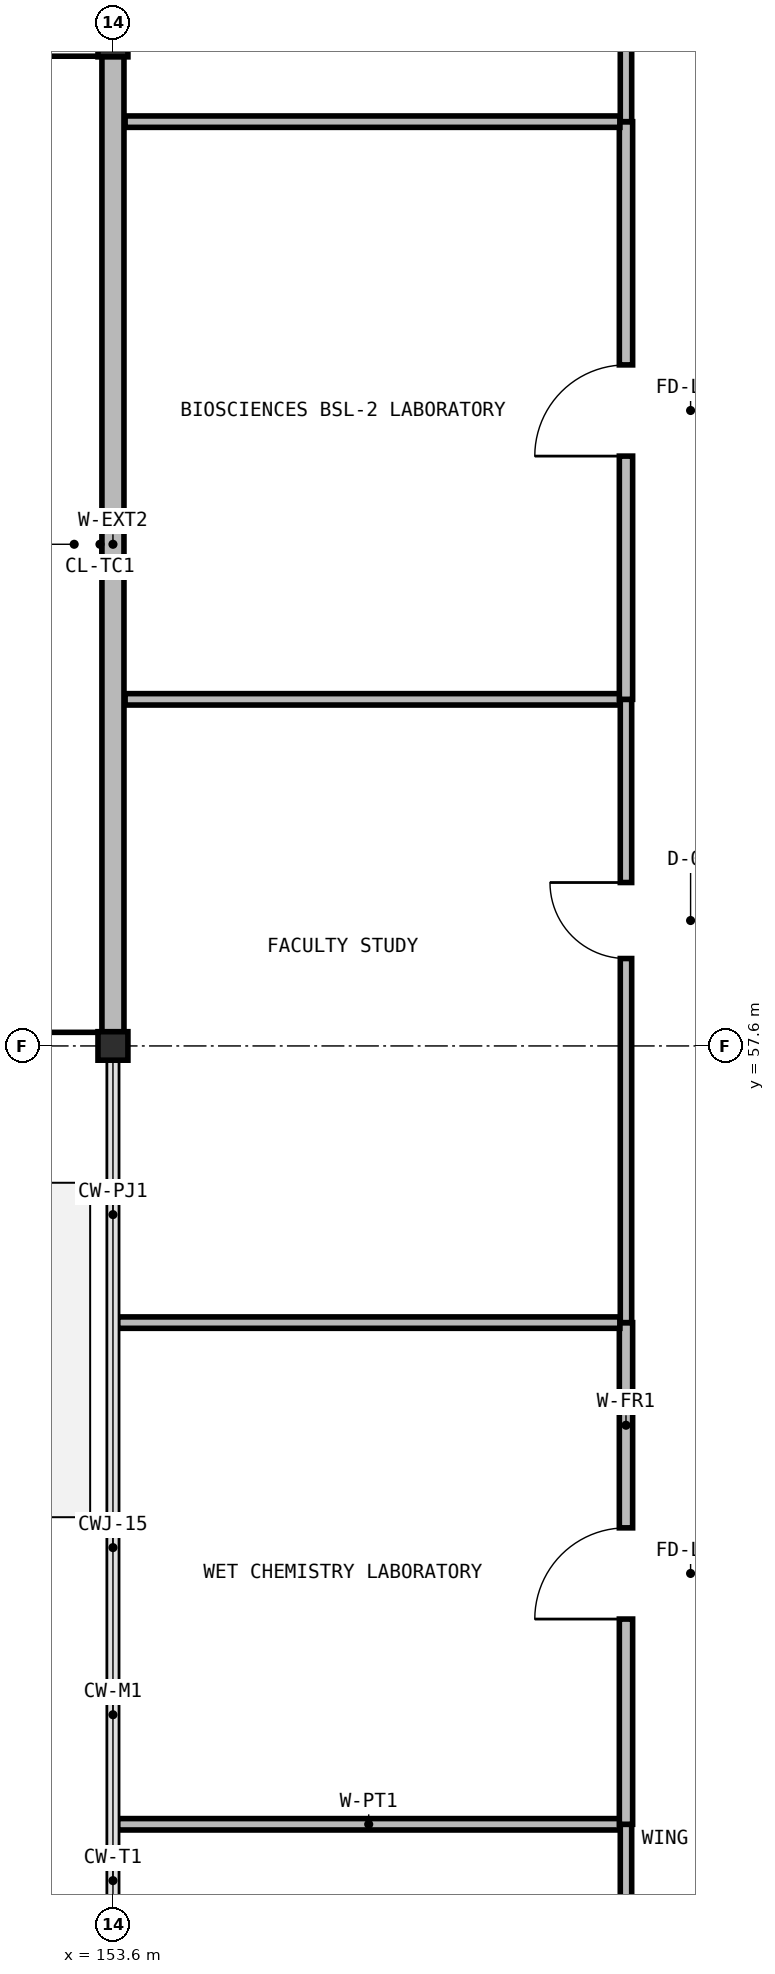
"""IFC4 building model, lengths in metres.
Left out: names, types, materials, properties, quantities, classifications, styles, units other than length and angle.
Written with IfcOpenShell. Run it as: python <this file> out.ifc"""

import sys

from ifc_helpers import new_model, si_unit, direction, frame, frame_2d, origin, origin_2d, place, context, subcontext, project, spatial, rectangle, i_section, extrude, element, fill, save


model = new_model("IFC4")
c1 = context("Model", 3, precision=1e-05, world=origin(), true_north=direction((0.0, 1.0)))
c2 = subcontext(c1, "Body", "Model", "MODEL_VIEW")
j1 = project(units=[si_unit("LENGTHUNIT", "METRE"), si_unit("PLANEANGLEUNIT", "RADIAN")], contexts=[c1])
p1 = place(None, origin())
s1 = spatial("IfcSite", under=j1, at=p1, CompositionType="ELEMENT")
p2 = place(p1, origin())
s2 = spatial("IfcBuilding", under=s1, at=p2, CompositionType="ELEMENT")
p3 = place(p2, frame((0.0, 0.0, 9.8)))
s3 = spatial("IfcBuildingStorey", under=s2, at=p3, CompositionType="ELEMENT", Elevation=9.8)
for number, where, z_axis, x_axis in (
    (1, (153.6, 57.6, 0.0), (0.0, 0.0, 1.0), (1.0, 0.0, 0.0)),
    (2, (153.6, 70.8, 0.0), (0.0, 0.0, 1.0), (1.0, 0.0, 0.0)),
):
    element("IfcColumn", number, at=place(p3, frame(where, z_axis=z_axis, x_axis=x_axis)), inside=s3, PredefinedType="COLUMN", context=c2, shape_type="SweptSolid", body=[
        extrude(i_section(OverallWidth=0.394, OverallDepth=0.375, WebThickness=0.02, FlangeThickness=0.032, at=origin_2d()), origin(), (0.0, 0.0, 1.0), 4.55),
    ])
p4 = place(p3, frame((153.6, 57.604, 0.0), z_axis=(0.0, 0.0, 1.0), x_axis=(0.0, 1.0, 0.0)))
e3 = element("IfcWall", 3, at=p4, inside=s3, PredefinedType="SOLIDWALL", context=c2, shape_type="SweptSolid", body=[
    extrude(rectangle(XDim=13.192, YDim=0.29, at=frame_2d((6.596, 0.0))), origin(), (0.0, 0.0, 1.0), 3.742),
])
p5 = place(p3, frame((160.35, 37.96, 0.0), z_axis=(0.0, 0.0, 1.0), x_axis=(0.0, 1.0, 0.0)))
e4 = element("IfcWall", 4, at=p5, inside=s3, PredefinedType="PARTITIONING", context=c2, shape_type="SweptSolid", body=[
    extrude(rectangle(XDim=9.4, YDim=0.15, at=frame_2d((4.7, 0.0))), origin(), (0.0, 0.0, 1.0), 4.3),
])
p6 = place(p5, frame((4.2, 0.0, 0.0)))
e5 = element("IfcOpeningElement", 5, at=p6, cuts=e4, PredefinedType="OPENING", context=c2, shape_type="SweptSolid", body=[
    extrude(rectangle(XDim=1.0, YDim=2.2, at=frame_2d((0.5, 1.1))), frame((0.0, 0.085, 0.0), z_axis=(0.0, -1.0, 0.0), x_axis=(1.0, 0.0, 0.0)), (0.0, 0.0, 1.0), 0.17),
])
p7 = place(p3, frame((153.66, 47.36, 0.0), z_axis=(0.0, 0.0, 1.0), x_axis=(1.0, 0.0, 0.0)))
e6 = element("IfcWall", 6, at=p7, inside=s3, PredefinedType="PARTITIONING", context=c2, shape_type="SweptSolid", body=[
    extrude(rectangle(XDim=6.61, YDim=0.15, at=frame_2d((3.305, 0.0))), origin(), (0.0, 0.0, 1.0), 4.3),
])
p8 = place(p3, frame((160.35, 47.36, 0.0), z_axis=(0.0, 0.0, 1.0), x_axis=(0.0, 1.0, 0.0)))
e7 = element("IfcWall", 7, at=p8, inside=s3, PredefinedType="PARTITIONING", context=c2, shape_type="SweptSolid", body=[
    extrude(rectangle(XDim=6.6, YDim=0.175, at=frame_2d((3.3, 0.0))), origin(), (0.0, 0.0, 1.0), 4.3),
])
p9 = place(p8, frame((2.7, 0.0, 0.0)))
e8 = element("IfcOpeningElement", 8, at=p9, cuts=e7, PredefinedType="OPENING", context=c2, shape_type="SweptSolid", body=[
    extrude(rectangle(XDim=1.2, YDim=2.2, at=frame_2d((0.6, 1.1))), frame((0.0, 0.097, 0.0), z_axis=(0.0, -1.0, 0.0), x_axis=(1.0, 0.0, 0.0)), (0.0, 0.0, 1.0), 0.195),
])
p10 = place(p3, frame((153.66, 53.96, 0.0), z_axis=(0.0, 0.0, 1.0), x_axis=(1.0, 0.0, 0.0)))
e9 = element("IfcWall", 9, at=p10, inside=s3, PredefinedType="PARTITIONING", context=c2, shape_type="SweptSolid", body=[
    extrude(rectangle(XDim=6.61, YDim=0.15, at=frame_2d((3.305, 0.0))), origin(), (0.0, 0.0, 1.0), 4.3),
])
p11 = place(p3, frame((160.35, 53.96, 0.0), z_axis=(0.0, 0.0, 1.0), x_axis=(0.0, 1.0, 0.0)))
e10 = element("IfcWall", 10, at=p11, inside=s3, PredefinedType="PARTITIONING", context=c2, shape_type="SweptSolid", body=[
    extrude(rectangle(XDim=8.2, YDim=0.15, at=frame_2d((4.1, 0.0))), origin(), (0.0, 0.0, 1.0), 4.3),
])
p12 = place(p11, frame((4.79, 0.0, 0.0)))
e11 = element("IfcOpeningElement", 11, at=p12, cuts=e10, PredefinedType="OPENING", context=c2, shape_type="SweptSolid", body=[
    extrude(rectangle(XDim=1.0, YDim=2.2, at=frame_2d((0.5, 1.1))), frame((0.0, 0.085, 0.0), z_axis=(0.0, -1.0, 0.0), x_axis=(1.0, 0.0, 0.0)), (0.0, 0.0, 1.0), 0.17),
])
p13 = place(p3, frame((153.76, 62.16, 0.0), z_axis=(0.0, 0.0, 1.0), x_axis=(1.0, 0.0, 0.0)))
e12 = element("IfcWall", 12, at=p13, inside=s3, PredefinedType="PARTITIONING", context=c2, shape_type="SweptSolid", body=[
    extrude(rectangle(XDim=6.51, YDim=0.15, at=frame_2d((3.255, 0.0))), origin(), (0.0, 0.0, 1.0), 4.3),
])
p14 = place(p3, frame((160.35, 62.16, 0.0), z_axis=(0.0, 0.0, 1.0), x_axis=(0.0, 1.0, 0.0)))
e13 = element("IfcWall", 13, at=p14, inside=s3, PredefinedType="PARTITIONING", context=c2, shape_type="SweptSolid", body=[
    extrude(rectangle(XDim=7.6, YDim=0.175, at=frame_2d((3.8, 0.0))), origin(), (0.0, 0.0, 1.0), 4.3),
])
p15 = place(p14, frame((3.2, 0.0, 0.0)))
e14 = element("IfcOpeningElement", 14, at=p15, cuts=e13, PredefinedType="OPENING", context=c2, shape_type="SweptSolid", body=[
    extrude(rectangle(XDim=1.2, YDim=2.2, at=frame_2d((0.6, 1.1))), frame((0.0, 0.097, 0.0), z_axis=(0.0, -1.0, 0.0), x_axis=(1.0, 0.0, 0.0)), (0.0, 0.0, 1.0), 0.195),
])
p16 = place(p3, frame((153.76, 69.76, 0.0), z_axis=(0.0, 0.0, 1.0), x_axis=(1.0, 0.0, 0.0)))
e15 = element("IfcWall", 15, at=p16, inside=s3, PredefinedType="PARTITIONING", context=c2, shape_type="SweptSolid", body=[
    extrude(rectangle(XDim=6.51, YDim=0.15, at=frame_2d((3.255, 0.0))), origin(), (0.0, 0.0, 1.0), 4.3),
])
p17 = place(p3, frame((160.35, 69.76, 0.0), z_axis=(0.0, 0.0, 1.0), x_axis=(0.0, 1.0, 0.0)))
e16 = element("IfcWall", 16, at=p17, inside=s3, PredefinedType="PARTITIONING", context=c2, shape_type="SweptSolid", body=[
    extrude(rectangle(XDim=9.4, YDim=0.15, at=frame_2d((4.7, 0.0))), origin(), (0.0, 0.0, 1.0), 4.3),
])
p18 = place(p17, frame((4.2, 0.0, 0.0)))
e17 = element("IfcOpeningElement", 17, at=p18, cuts=e16, PredefinedType="OPENING", context=c2, shape_type="SweptSolid", body=[
    extrude(rectangle(XDim=1.0, YDim=2.2, at=frame_2d((0.5, 1.1))), frame((0.0, 0.085, 0.0), z_axis=(0.0, -1.0, 0.0), x_axis=(1.0, 0.0, 0.0)), (0.0, 0.0, 1.0), 0.17),
])
p19 = place(p9, origin())
e18 = element("IfcDoor", 18, at=p19, inside=s3, OperationType="SINGLE_SWING_LEFT", PredefinedType="DOOR", context=c2, shape_type="SweptSolid", body=[
    extrude(rectangle(XDim=1.2, YDim=2.2, at=frame_2d((0.6, 1.1))), frame((0.0, 0.025, 0.0), z_axis=(0.0, -1.0, 0.0), x_axis=(1.0, 0.0, 0.0)), (0.0, 0.0, 1.0), 0.05),
])
fill(e8, e18)
p20 = place(p12, origin())
e19 = element("IfcDoor", 19, at=p20, inside=s3, OperationType="SINGLE_SWING_RIGHT", PredefinedType="DOOR", context=c2, shape_type="SweptSolid", body=[
    extrude(rectangle(XDim=1.0, YDim=2.2, at=frame_2d((0.5, 1.1))), frame((0.0, 0.025, 0.0), z_axis=(0.0, -1.0, 0.0), x_axis=(1.0, 0.0, 0.0)), (0.0, 0.0, 1.0), 0.05),
])
fill(e11, e19)
p21 = place(p15, origin())
e20 = element("IfcDoor", 20, at=p21, inside=s3, OperationType="SINGLE_SWING_LEFT", PredefinedType="DOOR", context=c2, shape_type="SweptSolid", body=[
    extrude(rectangle(XDim=1.2, YDim=2.2, at=frame_2d((0.6, 1.1))), frame((0.0, 0.025, 0.0), z_axis=(0.0, -1.0, 0.0), x_axis=(1.0, 0.0, 0.0)), (0.0, 0.0, 1.0), 0.05),
])
fill(e14, e20)
save(model, sys.argv[1])
